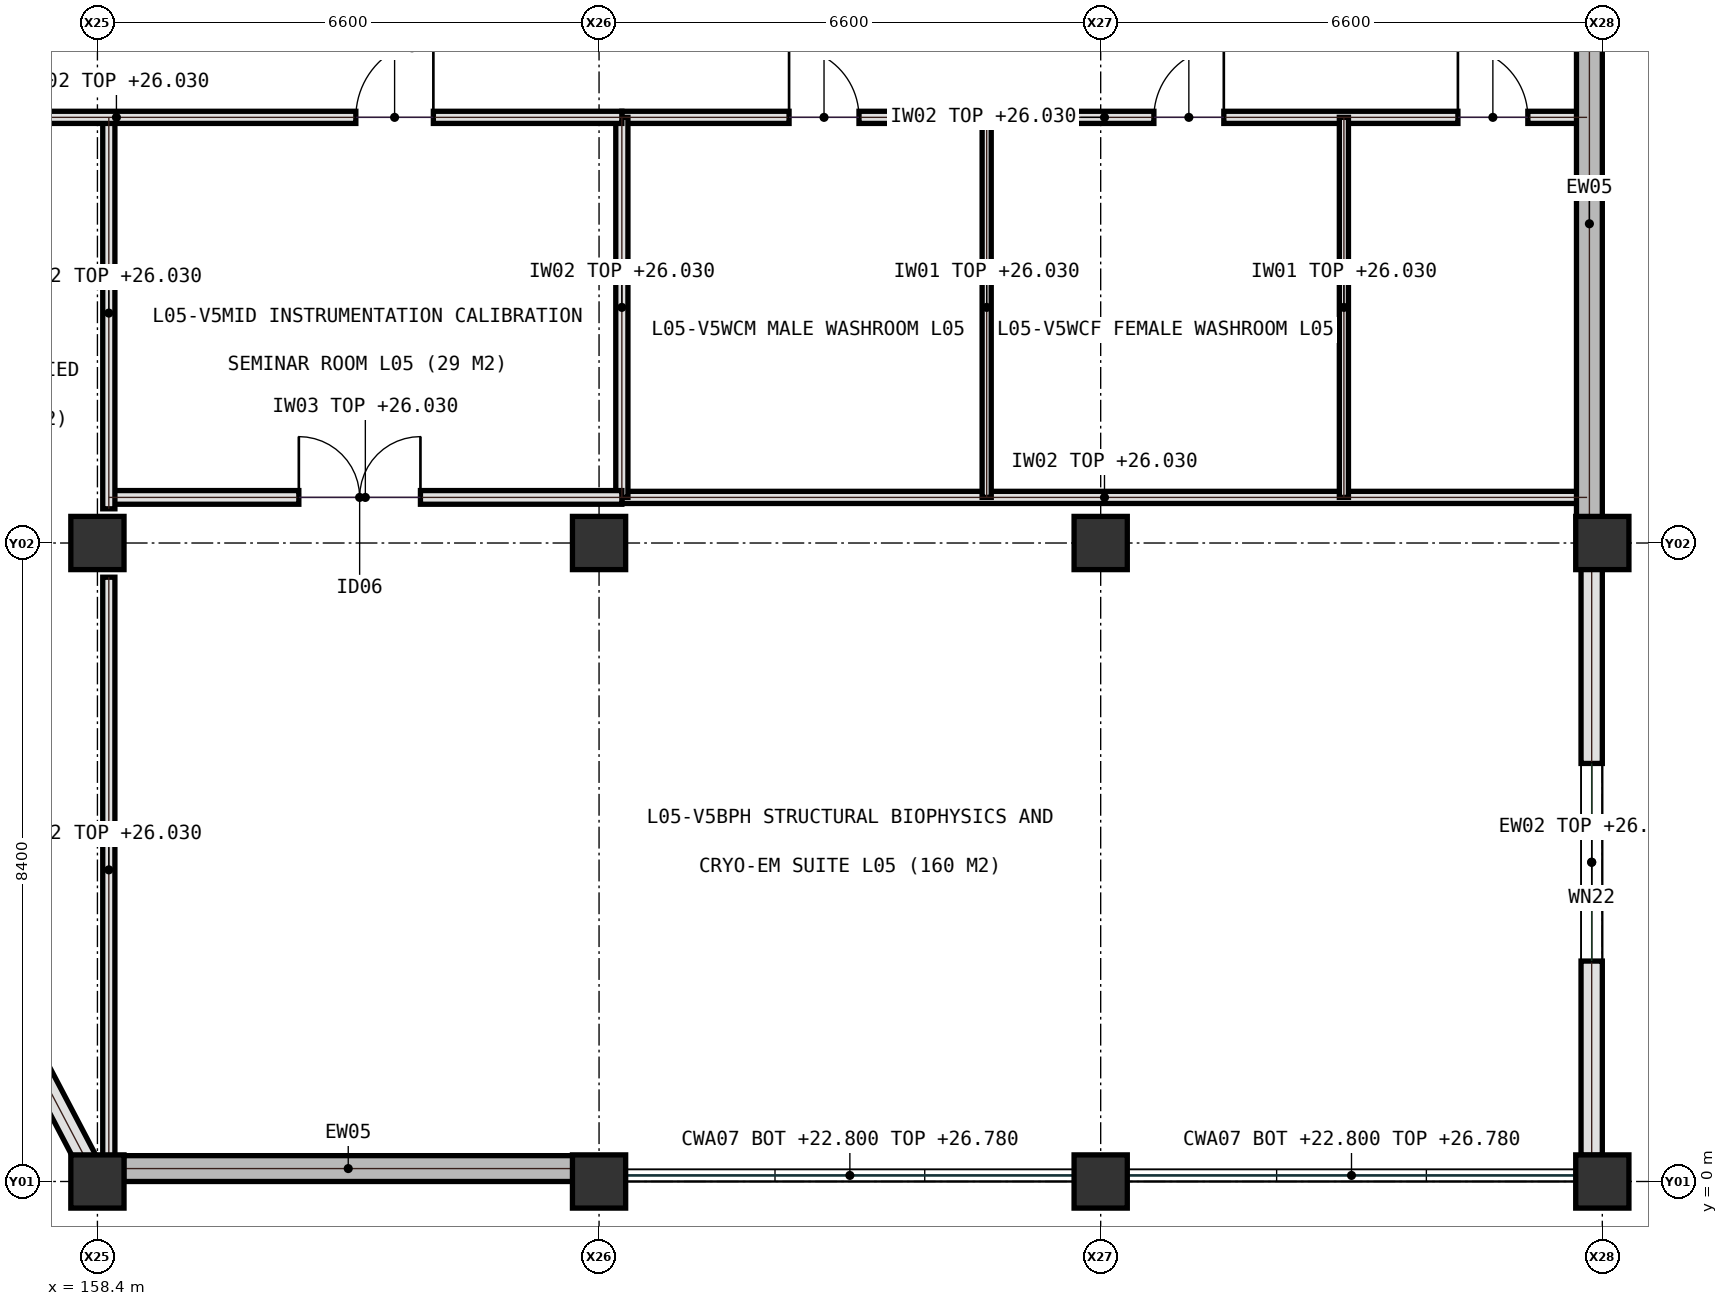
"""IFC4 building model, lengths in metres.
Left out: names, types, materials, properties, quantities, classifications, styles, units other than length and angle.
Written with IfcOpenShell. Run it as: python <this file> out.ifc"""

import sys

from ifc_helpers import new_model, si_unit, direction, frame, frame_2d, origin, origin_2d, place, context, subcontext, project, spatial, rectangle, extrude, element, fill, save


model = new_model("IFC4")
c1 = context("Model", 3, precision=1e-05, world=origin(), true_north=direction((0.0, 1.0)))
c2 = subcontext(c1, "Body", "Model", "MODEL_VIEW")
j1 = project(units=[si_unit("LENGTHUNIT", "METRE"), si_unit("PLANEANGLEUNIT", "RADIAN")], contexts=[c1])
p1 = place(None, origin())
s1 = spatial("IfcSite", under=j1, at=p1, CompositionType="ELEMENT")
p2 = place(p1, origin())
s2 = spatial("IfcBuilding", under=s1, at=p2, CompositionType="ELEMENT")
p3 = place(p2, frame((0.0, 0.0, 22.8)))
s3 = spatial("IfcBuildingStorey", under=s2, at=p3, CompositionType="ELEMENT", Elevation=22.8)
for number, where, z_axis, x_axis in (
    (1, (158.4, 0.0, 0.0), (0.0, 0.0, 1.0), (1.0, 0.0, 0.0)),
    (2, (158.4, 8.4, 0.0), (0.0, 0.0, 1.0), (1.0, 0.0, 0.0)),
    (3, (165.0, 0.0, 0.0), (0.0, 0.0, 1.0), (1.0, 0.0, 0.0)),
    (4, (165.0, 8.4, 0.0), (0.0, 0.0, 1.0), (1.0, 0.0, 0.0)),
    (5, (171.6, 0.0, 0.0), (0.0, 0.0, 1.0), (1.0, 0.0, 0.0)),
    (6, (171.6, 8.4, 0.0), (0.0, 0.0, 1.0), (1.0, 0.0, 0.0)),
    (7, (178.2, 0.0, 0.0), (0.0, 0.0, 1.0), (1.0, 0.0, 0.0)),
    (8, (178.2, 8.4, 0.0), (0.0, 0.0, 1.0), (1.0, 0.0, 0.0)),
):
    element("IfcColumn", number, at=place(p3, frame(where, z_axis=z_axis, x_axis=x_axis)), inside=s3, PredefinedType="COLUMN", context=c2, shape_type="SweptSolid", body=[
        extrude(rectangle(XDim=0.7, YDim=0.7, at=origin_2d()), origin(), (0.0, 0.0, 1.0), 4.2),
    ])
p4 = place(p3, frame((165.3, 14.0, 0.0), z_axis=(0.0, 0.0, 1.0), x_axis=(1.0, 0.0, 0.0)))
e9 = element("IfcWall", 9, at=p4, inside=s3, PredefinedType="PARTITIONING", context=c2, shape_type="SweptSolid", body=[
    extrude(rectangle(XDim=12.7, YDim=0.16, at=frame_2d((6.35, 0.0))), origin(), (0.0, 0.0, 1.0), 3.23),
])
p5 = place(p4, frame((2.2, 0.0, 0.0)))
e10 = element("IfcOpeningElement", 10, at=p5, cuts=e9, PredefinedType="OPENING", context=c2, shape_type="SweptSolid", body=[
    extrude(rectangle(XDim=0.92, YDim=2.08, at=frame_2d((0.46, 1.04))), frame((0.0, 0.09, 0.0), z_axis=(0.0, -1.0, 0.0), x_axis=(1.0, 0.0, 0.0)), (0.0, 0.0, 1.0), 0.18),
])
p6 = place(p4, frame((7.0, 0.0, 0.0)))
e11 = element("IfcOpeningElement", 11, at=p6, cuts=e9, PredefinedType="OPENING", context=c2, shape_type="SweptSolid", body=[
    extrude(rectangle(XDim=0.92, YDim=2.08, at=frame_2d((0.46, 1.04))), frame((0.0, 0.09, 0.0), z_axis=(0.0, -1.0, 0.0), x_axis=(1.0, 0.0, 0.0)), (0.0, 0.0, 1.0), 0.18),
])
p7 = place(p4, frame((11.0, 0.0, 0.0)))
e12 = element("IfcOpeningElement", 12, at=p7, cuts=e9, PredefinedType="OPENING", context=c2, shape_type="SweptSolid", body=[
    extrude(rectangle(XDim=0.92, YDim=2.08, at=frame_2d((0.46, 1.04))), frame((0.0, 0.09, 0.0), z_axis=(0.0, -1.0, 0.0), x_axis=(1.0, 0.0, 0.0)), (0.0, 0.0, 1.0), 0.18),
])
p8 = place(p3, frame((165.3, 9.0, 0.0), z_axis=(0.0, 0.0, 1.0), x_axis=(1.0, 0.0, 0.0)))
e13 = element("IfcWall", 13, at=p8, inside=s3, PredefinedType="PARTITIONING", context=c2, shape_type="SweptSolid", body=[
    extrude(rectangle(XDim=12.7, YDim=0.16, at=frame_2d((6.35, 0.0))), origin(), (0.0, 0.0, 1.0), 3.23),
])
p9 = place(p3, frame((165.3, 9.0, 0.0), z_axis=(0.0, 0.0, 1.0), x_axis=(0.0, 1.0, 0.0)))
e14 = element("IfcWall", 14, at=p9, inside=s3, PredefinedType="PARTITIONING", context=c2, shape_type="SweptSolid", body=[
    extrude(rectangle(XDim=5.0, YDim=0.16, at=frame_2d((2.5, 0.0))), origin(), (0.0, 0.0, 1.0), 3.23),
])
for number, where, z_axis, x_axis in (
    (15, (170.1, 9.0, 0.0), (0.0, 0.0, 1.0), (0.0, 1.0, 0.0)),
    (16, (174.8, 9.0, 0.0), (0.0, 0.0, 1.0), (0.0, 1.0, 0.0)),
):
    element("IfcWall", number, at=place(p3, frame(where, z_axis=z_axis, x_axis=x_axis)), inside=s3, PredefinedType="PARTITIONING", context=c2, shape_type="SweptSolid", body=[
        extrude(rectangle(XDim=5.0, YDim=0.12, at=frame_2d((2.5, 0.0))), origin(), (0.0, 0.0, 1.0), 3.23),
    ])
p10 = place(p3, frame((158.55, 9.0, 0.0), z_axis=(0.0, 0.0, 1.0), x_axis=(1.0, 0.0, 0.0)))
e17 = element("IfcWall", 17, at=p10, inside=s3, PredefinedType="SOLIDWALL", context=c2, shape_type="SweptSolid", body=[
    extrude(rectangle(XDim=6.75, YDim=0.18, at=frame_2d((3.375, 0.0))), origin(), (0.0, 0.0, 1.0), 3.23),
])
p11 = place(p10, frame((2.5, 0.0, 0.0)))
e18 = element("IfcOpeningElement", 18, at=p11, cuts=e17, PredefinedType="OPENING", context=c2, shape_type="SweptSolid", body=[
    extrude(rectangle(XDim=1.6, YDim=2.2, at=frame_2d((0.8, 1.1))), frame((0.0, 0.1, 0.0), z_axis=(0.0, -1.0, 0.0), x_axis=(1.0, 0.0, 0.0)), (0.0, 0.0, 1.0), 0.2),
])
p12 = place(p3, frame((158.55, 0.25, 0.0), z_axis=(0.0, 0.0, 1.0), x_axis=(0.0, 1.0, 0.0)))
e19 = element("IfcWall", 19, at=p12, inside=s3, PredefinedType="PARTITIONING", context=c2, shape_type="SweptSolid", body=[
    extrude(rectangle(XDim=7.7, YDim=0.16, at=frame_2d((3.85, 0.0))), origin(), (0.0, 0.0, 1.0), 3.23),
])
p13 = place(p3, frame((158.55, 8.85, 0.0), z_axis=(0.0, 0.0, 1.0), x_axis=(0.0, 1.0, 0.0)))
e20 = element("IfcWall", 20, at=p13, inside=s3, PredefinedType="PARTITIONING", context=c2, shape_type="SweptSolid", body=[
    extrude(rectangle(XDim=5.15, YDim=0.16, at=frame_2d((2.575, 0.0))), origin(), (0.0, 0.0, 1.0), 3.23),
])
p14 = place(p3, frame((152.0, 14.0, 0.0), z_axis=(0.0, 0.0, 1.0), x_axis=(1.0, 0.0, 0.0)))
e21 = element("IfcWall", 21, at=p14, inside=s3, PredefinedType="PARTITIONING", context=c2, shape_type="SweptSolid", body=[
    extrude(rectangle(XDim=13.3, YDim=0.16, at=frame_2d((6.65, 0.0))), origin(), (0.0, 0.0, 1.0), 3.23),
])
p15 = place(p14, frame((2.6, 0.0, 0.0)))
e22 = element("IfcOpeningElement", 22, at=p15, cuts=e21, PredefinedType="OPENING", context=c2, shape_type="SweptSolid", body=[
    extrude(rectangle(XDim=1.02, YDim=2.18, at=frame_2d((0.51, 1.09))), frame((0.0, 0.09, 0.0), z_axis=(0.0, -1.0, 0.0), x_axis=(1.0, 0.0, 0.0)), (0.0, 0.0, 1.0), 0.18),
])
p16 = place(p14, frame((9.8, 0.0, 0.0)))
e23 = element("IfcOpeningElement", 23, at=p16, cuts=e21, PredefinedType="OPENING", context=c2, shape_type="SweptSolid", body=[
    extrude(rectangle(XDim=1.02, YDim=2.18, at=frame_2d((0.51, 1.09))), frame((0.0, 0.09, 0.0), z_axis=(0.0, -1.0, 0.0), x_axis=(1.0, 0.0, 0.0)), (0.0, 0.0, 1.0), 0.18),
])
p17 = place(p3, frame((158.745, 0.17, 0.0), z_axis=(0.0, 0.0, 1.0), x_axis=(1.0, 0.0, 0.0)))
e24 = element("IfcWall", 24, at=p17, inside=s3, PredefinedType="SHEAR", context=c2, shape_type="SweptSolid", body=[
    extrude(rectangle(XDim=5.91, YDim=0.34, at=frame_2d((2.955, 0.0))), origin(), (0.0, 0.0, 1.0), 3.98),
])
p18 = place(p3, frame((178.06, 0.345, 0.0), z_axis=(0.0, 0.0, 1.0), x_axis=(0.0, 1.0, 0.0)))
e25 = element("IfcWall", 25, at=p18, inside=s3, PredefinedType="SOLIDWALL", context=c2, shape_type="SweptSolid", body=[
    extrude(rectangle(XDim=7.71, YDim=0.28, at=frame_2d((3.855, 0.0))), origin(), (0.0, 0.0, 1.0), 3.265),
])
p19 = place(p18, frame((2.555, 0.0, 0.95)))
e26 = element("IfcOpeningElement", 26, at=p19, cuts=e25, PredefinedType="OPENING", context=c2, shape_type="SweptSolid", body=[
    extrude(rectangle(XDim=2.6, YDim=1.9, at=frame_2d((1.3, 0.95))), frame((0.0, 0.15, 0.0), z_axis=(0.0, -1.0, 0.0), x_axis=(1.0, 0.0, 0.0)), (0.0, 0.0, 1.0), 0.3),
])
p20 = place(p3, frame((178.03, 8.745, 0.0), z_axis=(0.0, 0.0, 1.0), x_axis=(0.0, 1.0, 0.0)))
e27 = element("IfcWall", 27, at=p20, inside=s3, PredefinedType="SHEAR", context=c2, shape_type="SweptSolid", body=[
    extrude(rectangle(XDim=7.71, YDim=0.34, at=frame_2d((3.855, 0.0))), origin(), (0.0, 0.0, 1.0), 3.98),
])
p21 = place(p3, frame((155.25, 6.01, 0.0), z_axis=(0.0, 0.0, 1.0), x_axis=(0.464471613901, -0.885588007981, 0.0)))
e28 = element("IfcWall", 28, at=p21, inside=s3, PredefinedType="SOLIDWALL", context=c2, shape_type="SweptSolid", body=[
    extrude(rectangle(XDim=6.459, YDim=0.28, at=frame_2d((3.229, 0.0))), origin(), (0.0, 0.0, 1.0), 3.365),
])
p22 = place(p21, frame((2.03, 0.0, 0.95)))
e29 = element("IfcOpeningElement", 29, at=p22, cuts=e28, PredefinedType="OPENING", context=c2, shape_type="SweptSolid", body=[
    extrude(rectangle(XDim=2.4, YDim=1.6, at=frame_2d((1.2, 0.8))), frame((0.0, 0.15, 0.0), z_axis=(0.0, -1.0, 0.0), x_axis=(1.0, 0.0, 0.0)), (0.0, 0.0, 1.0), 0.3),
])
p23 = place(p5, origin())
e30 = element("IfcDoor", 30, at=p23, inside=s3, OperationType="SINGLE_SWING_LEFT", PredefinedType="DOOR", context=c2, shape_type="SweptSolid", body=[
    extrude(rectangle(XDim=0.92, YDim=2.08, at=frame_2d((0.46, 1.04))), frame((0.0, 0.025, 0.0), z_axis=(0.0, -1.0, 0.0), x_axis=(1.0, 0.0, 0.0)), (0.0, 0.0, 1.0), 0.05),
])
fill(e10, e30)
p24 = place(p6, origin())
e31 = element("IfcDoor", 31, at=p24, inside=s3, OperationType="SINGLE_SWING_RIGHT", PredefinedType="DOOR", context=c2, shape_type="SweptSolid", body=[
    extrude(rectangle(XDim=0.92, YDim=2.08, at=frame_2d((0.46, 1.04))), frame((0.0, 0.025, 0.0), z_axis=(0.0, -1.0, 0.0), x_axis=(1.0, 0.0, 0.0)), (0.0, 0.0, 1.0), 0.05),
])
fill(e11, e31)
p25 = place(p7, origin())
e32 = element("IfcDoor", 32, at=p25, inside=s3, OperationType="SINGLE_SWING_LEFT", PredefinedType="DOOR", context=c2, shape_type="SweptSolid", body=[
    extrude(rectangle(XDim=0.92, YDim=2.08, at=frame_2d((0.46, 1.04))), frame((0.0, 0.025, 0.0), z_axis=(0.0, -1.0, 0.0), x_axis=(1.0, 0.0, 0.0)), (0.0, 0.0, 1.0), 0.05),
])
fill(e12, e32)
p26 = place(p11, origin())
e33 = element("IfcDoor", 33, at=p26, inside=s3, OperationType="DOUBLE_DOOR_SINGLE_SWING", PredefinedType="DOOR", context=c2, shape_type="SweptSolid", body=[
    extrude(rectangle(XDim=1.6, YDim=2.2, at=frame_2d((0.8, 1.1))), frame((0.0, 0.025, 0.0), z_axis=(0.0, -1.0, 0.0), x_axis=(1.0, 0.0, 0.0)), (0.0, 0.0, 1.0), 0.05),
])
fill(e18, e33)
p27 = place(p16, origin())
e34 = element("IfcDoor", 34, at=p27, inside=s3, OperationType="SINGLE_SWING_RIGHT", PredefinedType="DOOR", context=c2, shape_type="SweptSolid", body=[
    extrude(rectangle(XDim=1.02, YDim=2.18, at=frame_2d((0.51, 1.09))), frame((0.0, 0.025, 0.0), z_axis=(0.0, -1.0, 0.0), x_axis=(1.0, 0.0, 0.0)), (0.0, 0.0, 1.0), 0.05),
])
fill(e23, e34)
p28 = place(p19, origin())
e35 = element("IfcWindow", 35, at=p28, inside=s3, PartitioningType="SINGLE_PANEL", PredefinedType="WINDOW", context=c2, shape_type="SweptSolid", body=[
    extrude(rectangle(XDim=2.6, YDim=1.9, at=frame_2d((1.3, 0.95))), frame((0.0, 0.03, 0.0), z_axis=(0.0, -1.0, 0.0), x_axis=(1.0, 0.0, 0.0)), (0.0, 0.0, 1.0), 0.06),
])
fill(e26, e35)
save(model, sys.argv[1])
